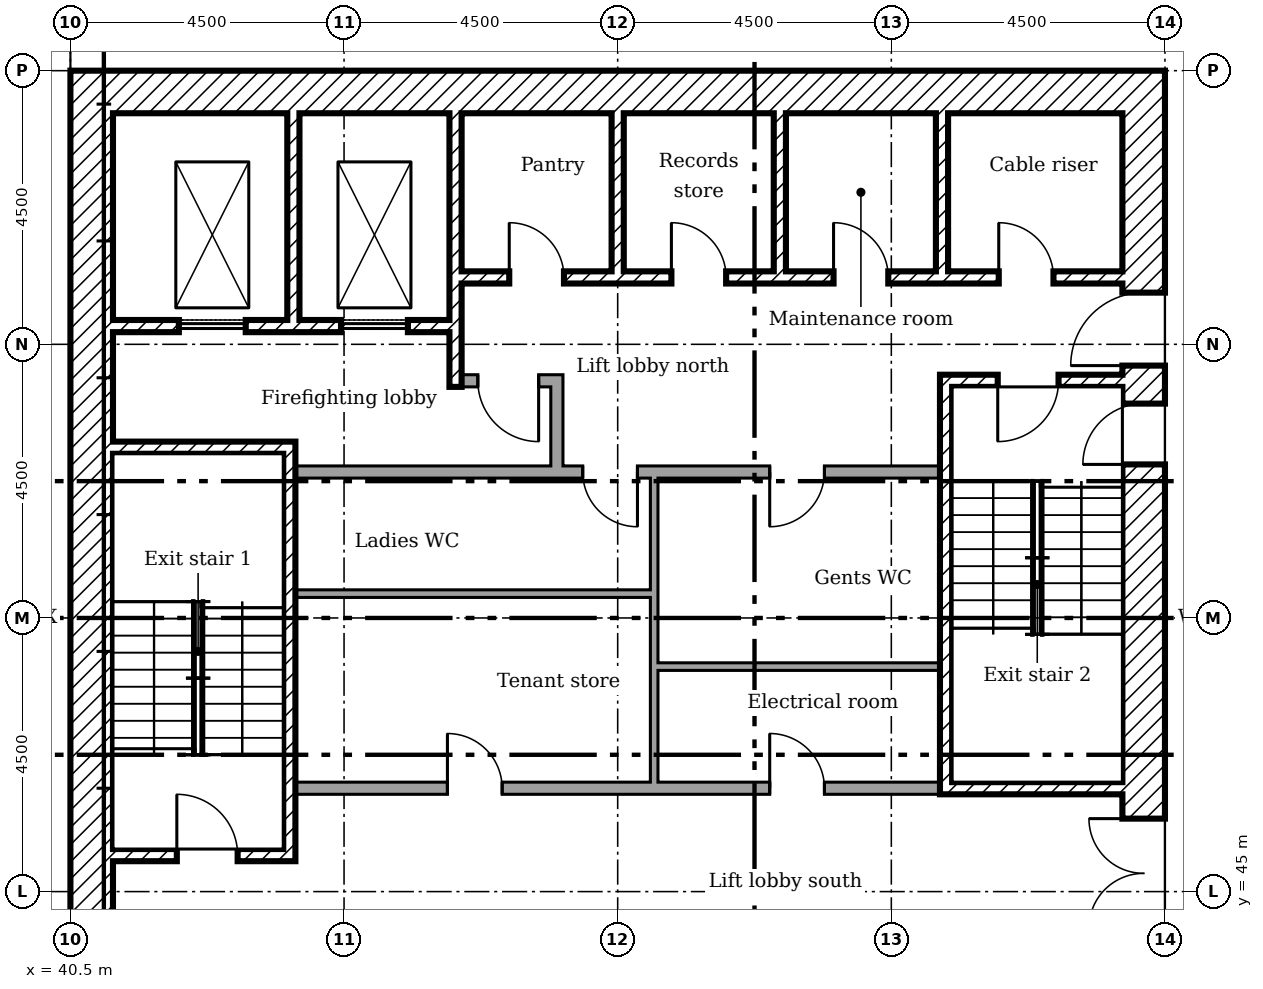
"""IFC4 building model, lengths in metres.
Left out: names, types, materials, properties, quantities, classifications, styles, units other than length and angle.
Written with IfcOpenShell. Run it as: python <this file> out.ifc"""

import sys

from ifc_helpers import new_model, si_unit, direction, frame, frame_2d, origin, place, context, subcontext, project, spatial, rectangle, extrude, element, fill, save


model = new_model("IFC4")
c1 = context("Model", 3, precision=1e-05, world=origin(), true_north=direction((0.0, 1.0)))
c2 = subcontext(c1, "Body", "Model", "MODEL_VIEW")
j1 = project(units=[si_unit("LENGTHUNIT", "METRE"), si_unit("PLANEANGLEUNIT", "RADIAN")], contexts=[c1])
p1 = place(None, origin())
s1 = spatial("IfcSite", under=j1, at=p1, CompositionType="ELEMENT")
p2 = place(p1, origin())
s2 = spatial("IfcBuilding", under=s1, at=p2, CompositionType="ELEMENT")
p3 = place(p2, frame((0.0, 0.0, 113.6)))
s3 = spatial("IfcBuildingStorey", under=s2, at=p3, CompositionType="ELEMENT", Elevation=113.6)
p4 = place(p3, frame((58.15, 40.5, 0.0), z_axis=(0.0, 0.0, 1.0), x_axis=(0.0, 1.0, 0.0)))
e1 = element("IfcWall", 1, at=p4, inside=s3, PredefinedType="SHEAR", context=c2, shape_type="SweptSolid", body=[
    extrude(rectangle(XDim=18.0, YDim=0.7, at=frame_2d((9.0, 0.0))), origin(), (0.0, 0.0, 1.0), 6.95),
])
p5 = place(p4, frame((13.15, 0.0, 0.0)))
e2 = element("IfcOpeningElement", 2, at=p5, cuts=e1, PredefinedType="OPENING", context=c2, shape_type="SweptSolid", body=[
    extrude(rectangle(XDim=1.2, YDim=2.1, at=frame_2d((0.6, 1.05))), frame((0.0, 0.36, 0.0), z_axis=(0.0, -1.0, 0.0), x_axis=(1.0, 0.0, 0.0)), (0.0, 0.0, 1.0), 0.72),
])
p6 = place(p4, frame((3.9, 0.0, 0.0)))
e3 = element("IfcOpeningElement", 3, at=p6, cuts=e1, PredefinedType="OPENING", context=c2, shape_type="SweptSolid", body=[
    extrude(rectangle(XDim=1.8, YDim=2.1, at=frame_2d((0.9, 1.05))), frame((0.0, 0.36, 0.0), z_axis=(0.0, -1.0, 0.0), x_axis=(1.0, 0.0, 0.0)), (0.0, 0.0, 1.0), 0.72),
])
p7 = place(p4, frame((11.525, 0.0, 0.0)))
e4 = element("IfcOpeningElement", 4, at=p7, cuts=e1, PredefinedType="OPENING", context=c2, shape_type="SweptSolid", body=[
    extrude(rectangle(XDim=1.0, YDim=2.1, at=frame_2d((0.5, 1.05))), frame((0.0, 0.36, 0.0), z_axis=(0.0, -1.0, 0.0), x_axis=(1.0, 0.0, 0.0)), (0.0, 0.0, 1.0), 0.72),
])
p8 = place(p3, frame((41.2, 58.15, 0.0)))
e5 = element("IfcWall", 5, at=p8, inside=s3, PredefinedType="SHEAR", context=c2, shape_type="SweptSolid", body=[
    extrude(rectangle(XDim=16.6, YDim=0.7, at=frame_2d((8.3, 0.0))), origin(), (0.0, 0.0, 1.0), 6.95),
])
p9 = place(p3, frame((40.85, 40.5, 0.0), z_axis=(0.0, 0.0, 1.0), x_axis=(0.0, 1.0, 0.0)))
e6 = element("IfcWall", 6, at=p9, inside=s3, PredefinedType="SHEAR", context=c2, shape_type="SweptSolid", body=[
    extrude(rectangle(XDim=18.0, YDim=0.7, at=frame_2d((9.0, 0.0))), origin(), (0.0, 0.0, 1.0), 6.95),
])
p10 = place(p3, frame((44.167, 57.8, 0.0), z_axis=(0.0, 0.0, 1.0), x_axis=(0.0, -1.0, 0.0)))
e7 = element("IfcWall", 7, at=p10, inside=s3, PredefinedType="SHEAR", context=c2, shape_type="SweptSolid", body=[
    extrude(rectangle(XDim=3.4, YDim=0.2, at=frame_2d((1.7, 0.0))), origin(), (0.0, 0.0, 1.0), 6.95),
])
p11 = place(p3, frame((46.833, 57.8, 0.0), z_axis=(0.0, 0.0, 1.0), x_axis=(0.0, -1.0, 0.0)))
e8 = element("IfcWall", 8, at=p11, inside=s3, PredefinedType="SHEAR", context=c2, shape_type="SweptSolid", body=[
    extrude(rectangle(XDim=4.5, YDim=0.2, at=frame_2d((2.25, 0.0))), origin(), (0.0, 0.0, 1.0), 6.95),
])
for number, where, z_axis, x_axis in (
    (9, (49.5, 57.8, 0.0), (0.0, 0.0, 1.0), (0.0, -1.0, 0.0)),
    (10, (52.167, 57.8, 0.0), (0.0, 0.0, 1.0), (0.0, -1.0, 0.0)),
    (11, (54.833, 57.8, 0.0), (0.0, 0.0, 1.0), (0.0, -1.0, 0.0)),
):
    element("IfcWall", number, at=place(p3, frame(where, z_axis=z_axis, x_axis=x_axis)), inside=s3, PredefinedType="SHEAR", context=c2, shape_type="SweptSolid", body=[
        extrude(rectangle(XDim=2.6, YDim=0.2, at=frame_2d((1.3, 0.0))), origin(), (0.0, 0.0, 1.0), 6.95),
    ])
p12 = place(p3, frame((48.5, 51.9, 0.0), z_axis=(0.0, 0.0, 1.0), x_axis=(0.0, 1.0, 0.0)))
e12 = element("IfcWall", 12, at=p12, inside=s3, PredefinedType="PARTITIONING", context=c2, shape_type="SweptSolid", body=[
    extrude(rectangle(XDim=1.6, YDim=0.2, at=frame_2d((0.8, 0.0))), origin(), (0.0, 0.0, 1.0), 6.95),
])
p13 = place(p3, frame((46.933, 53.4, 0.0)))
e13 = element("IfcWall", 13, at=p13, inside=s3, PredefinedType="PARTITIONING", context=c2, shape_type="SweptSolid", body=[
    extrude(rectangle(XDim=1.467, YDim=0.2, at=frame_2d((0.733, 0.0))), origin(), (0.0, 0.0, 1.0), 6.95),
])
p14 = place(p13, frame((0.267, 0.0, 0.0)))
e14 = element("IfcOpeningElement", 14, at=p14, cuts=e13, PredefinedType="OPENING", context=c2, shape_type="SweptSolid", body=[
    extrude(rectangle(XDim=1.0, YDim=2.1, at=frame_2d((0.5, 1.05))), frame((0.0, 0.11, 0.0), z_axis=(0.0, -1.0, 0.0), x_axis=(1.0, 0.0, 0.0)), (0.0, 0.0, 1.0), 0.22),
])
p15 = place(p3, frame((46.933, 55.1, 0.0)))
e15 = element("IfcWall", 15, at=p15, inside=s3, PredefinedType="SHEAR", context=c2, shape_type="SweptSolid", body=[
    extrude(rectangle(XDim=10.867, YDim=0.2, at=frame_2d((5.433, 0.0))), origin(), (0.0, 0.0, 1.0), 6.95),
])
p16 = place(p15, frame((8.833, 0.0, 0.0)))
e16 = element("IfcOpeningElement", 16, at=p16, cuts=e15, PredefinedType="OPENING", context=c2, shape_type="SweptSolid", body=[
    extrude(rectangle(XDim=0.9, YDim=2.1, at=frame_2d((0.45, 1.05))), frame((0.0, 0.11, 0.0), z_axis=(0.0, -1.0, 0.0), x_axis=(1.0, 0.0, 0.0)), (0.0, 0.0, 1.0), 0.22),
])
p17 = place(p15, frame((0.783, 0.0, 0.0)))
e17 = element("IfcOpeningElement", 17, at=p17, cuts=e15, PredefinedType="OPENING", context=c2, shape_type="SweptSolid", body=[
    extrude(rectangle(XDim=0.9, YDim=2.1, at=frame_2d((0.45, 1.05))), frame((0.0, 0.11, 0.0), z_axis=(0.0, -1.0, 0.0), x_axis=(1.0, 0.0, 0.0)), (0.0, 0.0, 1.0), 0.22),
])
p18 = place(p15, frame((3.45, 0.0, 0.0)))
e18 = element("IfcOpeningElement", 18, at=p18, cuts=e15, PredefinedType="OPENING", context=c2, shape_type="SweptSolid", body=[
    extrude(rectangle(XDim=0.9, YDim=2.1, at=frame_2d((0.45, 1.05))), frame((0.0, 0.11, 0.0), z_axis=(0.0, -1.0, 0.0), x_axis=(1.0, 0.0, 0.0)), (0.0, 0.0, 1.0), 0.22),
])
p19 = place(p15, frame((6.117, 0.0, 0.0)))
e19 = element("IfcOpeningElement", 19, at=p19, cuts=e15, PredefinedType="OPENING", context=c2, shape_type="SweptSolid", body=[
    extrude(rectangle(XDim=0.9, YDim=2.1, at=frame_2d((0.45, 1.05))), frame((0.0, 0.11, 0.0), z_axis=(0.0, -1.0, 0.0), x_axis=(1.0, 0.0, 0.0)), (0.0, 0.0, 1.0), 0.22),
])
p20 = place(p3, frame((41.2, 54.3, 0.0)))
e20 = element("IfcWall", 20, at=p20, inside=s3, PredefinedType="SHEAR", context=c2, shape_type="SweptSolid", body=[
    extrude(rectangle(XDim=5.533, YDim=0.2, at=frame_2d((2.767, 0.0))), origin(), (0.0, 0.0, 1.0), 6.95),
])
p21 = place(p20, frame((1.083, 0.0, 0.0)))
e21 = element("IfcOpeningElement", 21, at=p21, cuts=e20, PredefinedType="OPENING", context=c2, shape_type="SweptSolid", body=[
    extrude(rectangle(XDim=1.1, YDim=2.1, at=frame_2d((0.55, 1.05))), frame((0.0, 0.11, 0.0), z_axis=(0.0, -1.0, 0.0), x_axis=(1.0, 0.0, 0.0)), (0.0, 0.0, 1.0), 0.22),
])
p22 = place(p20, frame((3.75, 0.0, 0.0)))
e22 = element("IfcOpeningElement", 22, at=p22, cuts=e20, PredefinedType="OPENING", context=c2, shape_type="SweptSolid", body=[
    extrude(rectangle(XDim=1.1, YDim=2.1, at=frame_2d((0.55, 1.05))), frame((0.0, 0.11, 0.0), z_axis=(0.0, -1.0, 0.0), x_axis=(1.0, 0.0, 0.0)), (0.0, 0.0, 1.0), 0.22),
])
p23 = place(p3, frame((44.1, 45.5, 0.0), z_axis=(0.0, 0.0, 1.0), x_axis=(0.0, 1.0, 0.0)))
e23 = element("IfcWall", 23, at=p23, inside=s3, PredefinedType="SHEAR", context=c2, shape_type="SweptSolid", body=[
    extrude(rectangle(XDim=6.9, YDim=0.2, at=frame_2d((3.45, 0.0))), origin(), (0.0, 0.0, 1.0), 6.95),
])
p24 = place(p3, frame((41.2, 52.3, 0.0)))
e24 = element("IfcWall", 24, at=p24, inside=s3, PredefinedType="SHEAR", context=c2, shape_type="SweptSolid", body=[
    extrude(rectangle(XDim=2.8, YDim=0.2, at=frame_2d((1.4, 0.0))), origin(), (0.0, 0.0, 1.0), 6.95),
])
p25 = place(p3, frame((41.2, 45.6, 0.0)))
e25 = element("IfcWall", 25, at=p25, inside=s3, PredefinedType="SHEAR", context=c2, shape_type="SweptSolid", body=[
    extrude(rectangle(XDim=2.8, YDim=0.2, at=frame_2d((1.4, 0.0))), origin(), (0.0, 0.0, 1.0), 6.95),
])
p26 = place(p25, frame((1.05, 0.0, 0.0)))
e26 = element("IfcOpeningElement", 26, at=p26, cuts=e25, PredefinedType="OPENING", context=c2, shape_type="SweptSolid", body=[
    extrude(rectangle(XDim=1.0, YDim=2.1, at=frame_2d((0.5, 1.05))), frame((0.0, 0.11, 0.0), z_axis=(0.0, -1.0, 0.0), x_axis=(1.0, 0.0, 0.0)), (0.0, 0.0, 1.0), 0.22),
])
p27 = place(p3, frame((54.8, 53.4, 0.0)))
e27 = element("IfcWall", 27, at=p27, inside=s3, PredefinedType="SHEAR", context=c2, shape_type="SweptSolid", body=[
    extrude(rectangle(XDim=3.0, YDim=0.2, at=frame_2d((1.5, 0.0))), origin(), (0.0, 0.0, 1.0), 6.95),
])
p28 = place(p27, frame((0.95, 0.0, 0.0)))
e28 = element("IfcOpeningElement", 28, at=p28, cuts=e27, PredefinedType="OPENING", context=c2, shape_type="SweptSolid", body=[
    extrude(rectangle(XDim=1.0, YDim=2.1, at=frame_2d((0.5, 1.05))), frame((0.0, 0.11, 0.0), z_axis=(0.0, -1.0, 0.0), x_axis=(1.0, 0.0, 0.0)), (0.0, 0.0, 1.0), 0.22),
])
p29 = place(p3, frame((54.8, 46.7, 0.0)))
e29 = element("IfcWall", 29, at=p29, inside=s3, PredefinedType="SHEAR", context=c2, shape_type="SweptSolid", body=[
    extrude(rectangle(XDim=3.0, YDim=0.2, at=frame_2d((1.5, 0.0))), origin(), (0.0, 0.0, 1.0), 6.95),
])
p30 = place(p3, frame((54.9, 46.8, 0.0), z_axis=(0.0, 0.0, 1.0), x_axis=(0.0, 1.0, 0.0)))
e30 = element("IfcWall", 30, at=p30, inside=s3, PredefinedType="SHEAR", context=c2, shape_type="SweptSolid", body=[
    extrude(rectangle(XDim=6.5, YDim=0.2, at=frame_2d((3.25, 0.0))), origin(), (0.0, 0.0, 1.0), 6.95),
])
p31 = place(p3, frame((44.2, 51.9, 0.0)))
e31 = element("IfcWall", 31, at=p31, inside=s3, PredefinedType="PARTITIONING", context=c2, shape_type="SweptSolid", body=[
    extrude(rectangle(XDim=10.6, YDim=0.2, at=frame_2d((5.3, 0.0))), origin(), (0.0, 0.0, 1.0), 6.95),
])
p32 = place(p31, frame((4.725, 0.0, 0.0)))
e32 = element("IfcOpeningElement", 32, at=p32, cuts=e31, PredefinedType="OPENING", context=c2, shape_type="SweptSolid", body=[
    extrude(rectangle(XDim=0.9, YDim=2.1, at=frame_2d((0.45, 1.05))), frame((0.0, 0.11, 0.0), z_axis=(0.0, -1.0, 0.0), x_axis=(1.0, 0.0, 0.0)), (0.0, 0.0, 1.0), 0.22),
])
p33 = place(p31, frame((7.8, 0.0, 0.0)))
e33 = element("IfcOpeningElement", 33, at=p33, cuts=e31, PredefinedType="OPENING", context=c2, shape_type="SweptSolid", body=[
    extrude(rectangle(XDim=0.9, YDim=2.1, at=frame_2d((0.45, 1.05))), frame((0.0, 0.11, 0.0), z_axis=(0.0, -1.0, 0.0), x_axis=(1.0, 0.0, 0.0)), (0.0, 0.0, 1.0), 0.22),
])
p34 = place(p3, frame((44.2, 46.7, 0.0)))
e34 = element("IfcWall", 34, at=p34, inside=s3, PredefinedType="PARTITIONING", context=c2, shape_type="SweptSolid", body=[
    extrude(rectangle(XDim=10.6, YDim=0.2, at=frame_2d((5.3, 0.0))), origin(), (0.0, 0.0, 1.0), 6.95),
])
p35 = place(p34, frame((2.5, 0.0, 0.0)))
e35 = element("IfcOpeningElement", 35, at=p35, cuts=e34, PredefinedType="OPENING", context=c2, shape_type="SweptSolid", body=[
    extrude(rectangle(XDim=0.9, YDim=2.1, at=frame_2d((0.45, 1.05))), frame((0.0, 0.11, 0.0), z_axis=(0.0, -1.0, 0.0), x_axis=(1.0, 0.0, 0.0)), (0.0, 0.0, 1.0), 0.22),
])
p36 = place(p34, frame((7.8, 0.0, 0.0)))
e36 = element("IfcOpeningElement", 36, at=p36, cuts=e34, PredefinedType="OPENING", context=c2, shape_type="SweptSolid", body=[
    extrude(rectangle(XDim=0.9, YDim=2.1, at=frame_2d((0.45, 1.05))), frame((0.0, 0.11, 0.0), z_axis=(0.0, -1.0, 0.0), x_axis=(1.0, 0.0, 0.0)), (0.0, 0.0, 1.0), 0.22),
])
p37 = place(p3, frame((50.1, 46.8, 0.0), z_axis=(0.0, 0.0, 1.0), x_axis=(0.0, 1.0, 0.0)))
e37 = element("IfcWall", 37, at=p37, inside=s3, PredefinedType="PARTITIONING", context=c2, shape_type="SweptSolid", body=[
    extrude(rectangle(XDim=1.962, YDim=0.125, at=frame_2d((0.981, 0.0))), origin(), (0.0, 0.0, 1.0), 6.95),
])
p38 = place(p3, frame((54.8, 48.7, 0.0), z_axis=(0.0, 0.0, 1.0), x_axis=(-1.0, 0.0, 0.0)))
e38 = element("IfcWall", 38, at=p38, inside=s3, PredefinedType="PARTITIONING", context=c2, shape_type="SweptSolid", body=[
    extrude(rectangle(XDim=4.637, YDim=0.125, at=frame_2d((2.319, 0.0))), origin(), (0.0, 0.0, 1.0), 6.95),
])
p39 = place(p3, frame((50.1, 48.7, 0.0), z_axis=(0.0, 0.0, 1.0), x_axis=(0.0, 1.0, 0.0)))
e39 = element("IfcWall", 39, at=p39, inside=s3, PredefinedType="PARTITIONING", context=c2, shape_type="SweptSolid", body=[
    extrude(rectangle(XDim=1.262, YDim=0.125, at=frame_2d((0.631, 0.0))), origin(), (0.0, 0.0, 1.0), 6.95),
])
p40 = place(p3, frame((50.038, 49.9, 0.0), z_axis=(0.0, 0.0, 1.0), x_axis=(-1.0, 0.0, 0.0)))
e40 = element("IfcWall", 40, at=p40, inside=s3, PredefinedType="PARTITIONING", context=c2, shape_type="SweptSolid", body=[
    extrude(rectangle(XDim=5.838, YDim=0.125, at=frame_2d((2.919, 0.0))), origin(), (0.0, 0.0, 1.0), 6.95),
])
p41 = place(p3, frame((50.1, 49.9, 0.0), z_axis=(0.0, 0.0, 1.0), x_axis=(0.0, 1.0, 0.0)))
e41 = element("IfcWall", 41, at=p41, inside=s3, PredefinedType="PARTITIONING", context=c2, shape_type="SweptSolid", body=[
    extrude(rectangle(XDim=1.9, YDim=0.125, at=frame_2d((0.95, 0.0))), origin(), (0.0, 0.0, 1.0), 6.95),
])
p42 = place(p5, origin())
e42 = element("IfcDoor", 42, at=p42, inside=s3, OperationType="SINGLE_SWING_RIGHT", PredefinedType="DOOR", context=c2, shape_type="SweptSolid", body=[
    extrude(rectangle(XDim=1.2, YDim=2.1, at=frame_2d((0.6, 1.05))), frame((0.0, 0.025, 0.0), z_axis=(0.0, -1.0, 0.0), x_axis=(1.0, 0.0, 0.0)), (0.0, 0.0, 1.0), 0.05),
])
fill(e2, e42)
p43 = place(p6, origin())
e43 = element("IfcDoor", 43, at=p43, inside=s3, OperationType="DOUBLE_DOOR_SINGLE_SWING", PredefinedType="DOOR", context=c2, shape_type="SweptSolid", body=[
    extrude(rectangle(XDim=1.8, YDim=2.1, at=frame_2d((0.9, 1.05))), frame((0.0, 0.025, 0.0), z_axis=(0.0, -1.0, 0.0), x_axis=(1.0, 0.0, 0.0)), (0.0, 0.0, 1.0), 0.05),
])
fill(e3, e43)
p44 = place(p26, origin())
e44 = element("IfcDoor", 44, at=p44, inside=s3, OperationType="SINGLE_SWING_RIGHT", PredefinedType="DOOR", context=c2, shape_type="SweptSolid", body=[
    extrude(rectangle(XDim=1.0, YDim=2.1, at=frame_2d((0.5, 1.05))), frame((0.0, 0.025, 0.0), z_axis=(0.0, -1.0, 0.0), x_axis=(1.0, 0.0, 0.0)), (0.0, 0.0, 1.0), 0.05),
])
fill(e26, e44)
p45 = place(p28, frame((1.0, 0.0, 0.0), x_axis=(-1.0, 0.0, 0.0)))
e45 = element("IfcDoor", 45, at=p45, inside=s3, OperationType="SINGLE_SWING_LEFT", PredefinedType="DOOR", context=c2, shape_type="SweptSolid", body=[
    extrude(rectangle(XDim=1.0, YDim=2.1, at=frame_2d((0.5, 1.05))), frame((0.0, 0.025, 0.0), z_axis=(0.0, -1.0, 0.0), x_axis=(1.0, 0.0, 0.0)), (0.0, 0.0, 1.0), 0.05),
])
fill(e28, e45)
p46 = place(p7, origin())
e46 = element("IfcDoor", 46, at=p46, inside=s3, OperationType="SINGLE_SWING_RIGHT", PredefinedType="DOOR", context=c2, shape_type="SweptSolid", body=[
    extrude(rectangle(XDim=1.0, YDim=2.1, at=frame_2d((0.5, 1.05))), frame((0.0, 0.025, 0.0), z_axis=(0.0, -1.0, 0.0), x_axis=(1.0, 0.0, 0.0)), (0.0, 0.0, 1.0), 0.05),
])
fill(e4, e46)
p47 = place(p14, frame((1.0, 0.0, 0.0), x_axis=(-1.0, 0.0, 0.0)))
e47 = element("IfcDoor", 47, at=p47, inside=s3, OperationType="SINGLE_SWING_RIGHT", PredefinedType="DOOR", context=c2, shape_type="SweptSolid", body=[
    extrude(rectangle(XDim=1.0, YDim=2.1, at=frame_2d((0.5, 1.05))), frame((0.0, 0.025, 0.0), z_axis=(0.0, -1.0, 0.0), x_axis=(1.0, 0.0, 0.0)), (0.0, 0.0, 1.0), 0.05),
])
fill(e14, e47)
p48 = place(p16, origin())
e48 = element("IfcDoor", 48, at=p48, inside=s3, OperationType="SINGLE_SWING_RIGHT", PredefinedType="DOOR", context=c2, shape_type="SweptSolid", body=[
    extrude(rectangle(XDim=0.9, YDim=2.1, at=frame_2d((0.45, 1.05))), frame((0.0, 0.025, 0.0), z_axis=(0.0, -1.0, 0.0), x_axis=(1.0, 0.0, 0.0)), (0.0, 0.0, 1.0), 0.05),
])
fill(e16, e48)
p49 = place(p17, origin())
e49 = element("IfcDoor", 49, at=p49, inside=s3, OperationType="SINGLE_SWING_RIGHT", PredefinedType="DOOR", context=c2, shape_type="SweptSolid", body=[
    extrude(rectangle(XDim=0.9, YDim=2.1, at=frame_2d((0.45, 1.05))), frame((0.0, 0.025, 0.0), z_axis=(0.0, -1.0, 0.0), x_axis=(1.0, 0.0, 0.0)), (0.0, 0.0, 1.0), 0.05),
])
fill(e17, e49)
p50 = place(p18, origin())
e50 = element("IfcDoor", 50, at=p50, inside=s3, OperationType="SINGLE_SWING_RIGHT", PredefinedType="DOOR", context=c2, shape_type="SweptSolid", body=[
    extrude(rectangle(XDim=0.9, YDim=2.1, at=frame_2d((0.45, 1.05))), frame((0.0, 0.025, 0.0), z_axis=(0.0, -1.0, 0.0), x_axis=(1.0, 0.0, 0.0)), (0.0, 0.0, 1.0), 0.05),
])
fill(e18, e50)
p51 = place(p19, origin())
e51 = element("IfcDoor", 51, at=p51, inside=s3, OperationType="SINGLE_SWING_RIGHT", PredefinedType="DOOR", context=c2, shape_type="SweptSolid", body=[
    extrude(rectangle(XDim=0.9, YDim=2.1, at=frame_2d((0.45, 1.05))), frame((0.0, 0.025, 0.0), z_axis=(0.0, -1.0, 0.0), x_axis=(1.0, 0.0, 0.0)), (0.0, 0.0, 1.0), 0.05),
])
fill(e19, e51)
p52 = place(p35, origin())
e52 = element("IfcDoor", 52, at=p52, inside=s3, OperationType="SINGLE_SWING_RIGHT", PredefinedType="DOOR", context=c2, shape_type="SweptSolid", body=[
    extrude(rectangle(XDim=0.9, YDim=2.1, at=frame_2d((0.45, 1.05))), frame((0.0, 0.025, 0.0), z_axis=(0.0, -1.0, 0.0), x_axis=(1.0, 0.0, 0.0)), (0.0, 0.0, 1.0), 0.05),
])
fill(e35, e52)
p53 = place(p32, frame((0.9, 0.0, 0.0), x_axis=(-1.0, 0.0, 0.0)))
e53 = element("IfcDoor", 53, at=p53, inside=s3, OperationType="SINGLE_SWING_RIGHT", PredefinedType="DOOR", context=c2, shape_type="SweptSolid", body=[
    extrude(rectangle(XDim=0.9, YDim=2.1, at=frame_2d((0.45, 1.05))), frame((0.0, 0.025, 0.0), z_axis=(0.0, -1.0, 0.0), x_axis=(1.0, 0.0, 0.0)), (0.0, 0.0, 1.0), 0.05),
])
fill(e32, e53)
p54 = place(p36, origin())
e54 = element("IfcDoor", 54, at=p54, inside=s3, OperationType="SINGLE_SWING_RIGHT", PredefinedType="DOOR", context=c2, shape_type="SweptSolid", body=[
    extrude(rectangle(XDim=0.9, YDim=2.1, at=frame_2d((0.45, 1.05))), frame((0.0, 0.025, 0.0), z_axis=(0.0, -1.0, 0.0), x_axis=(1.0, 0.0, 0.0)), (0.0, 0.0, 1.0), 0.05),
])
fill(e36, e54)
p55 = place(p33, frame((0.9, 0.0, 0.0), x_axis=(-1.0, 0.0, 0.0)))
e55 = element("IfcDoor", 55, at=p55, inside=s3, OperationType="SINGLE_SWING_LEFT", PredefinedType="DOOR", context=c2, shape_type="SweptSolid", body=[
    extrude(rectangle(XDim=0.9, YDim=2.1, at=frame_2d((0.45, 1.05))), frame((0.0, 0.025, 0.0), z_axis=(0.0, -1.0, 0.0), x_axis=(1.0, 0.0, 0.0)), (0.0, 0.0, 1.0), 0.05),
])
fill(e33, e55)
p56 = place(p21, origin())
e56 = element("IfcDoor", 56, at=p56, inside=s3, OperationType="SLIDING_TO_LEFT", PredefinedType="DOOR", context=c2, shape_type="SweptSolid", body=[
    extrude(rectangle(XDim=1.1, YDim=2.1, at=frame_2d((0.55, 1.05))), frame((0.0, 0.025, 0.0), z_axis=(0.0, -1.0, 0.0), x_axis=(1.0, 0.0, 0.0)), (0.0, 0.0, 1.0), 0.05),
])
fill(e21, e56)
p57 = place(p22, origin())
e57 = element("IfcDoor", 57, at=p57, inside=s3, OperationType="SLIDING_TO_LEFT", PredefinedType="DOOR", context=c2, shape_type="SweptSolid", body=[
    extrude(rectangle(XDim=1.1, YDim=2.1, at=frame_2d((0.55, 1.05))), frame((0.0, 0.025, 0.0), z_axis=(0.0, -1.0, 0.0), x_axis=(1.0, 0.0, 0.0)), (0.0, 0.0, 1.0), 0.05),
])
fill(e22, e57)
save(model, sys.argv[1])
